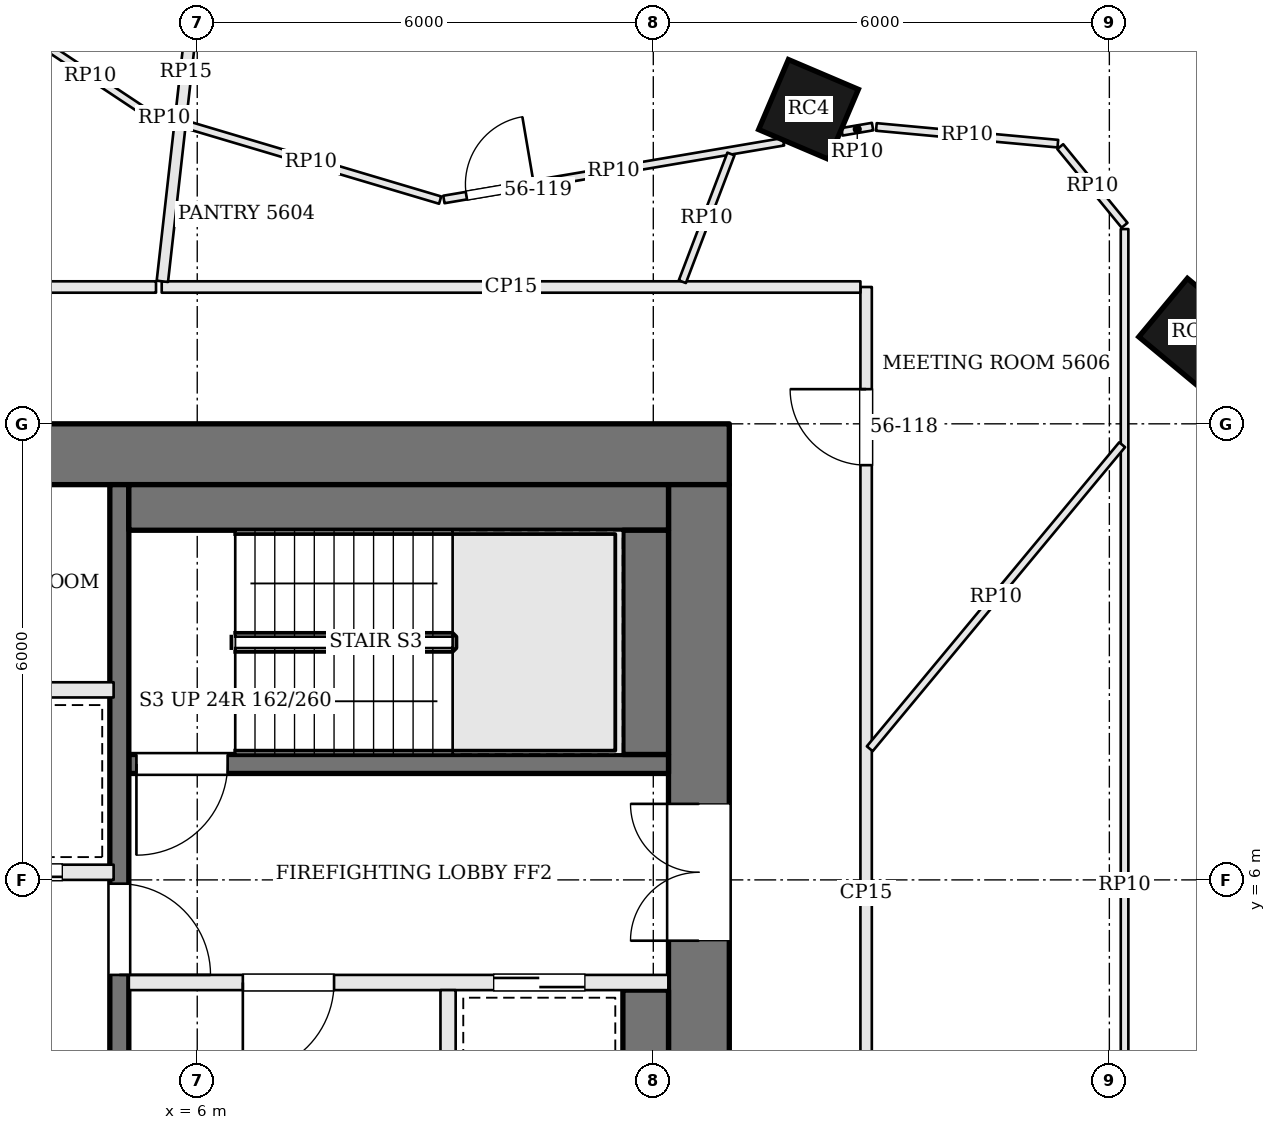
"""IFC4 building model, lengths in metres.
Left out: names, types, materials, properties, quantities, classifications, styles, units other than length and angle.
Written with IfcOpenShell. Run it as: python <this file> out.ifc"""

import sys

from ifc_helpers import new_model, si_unit, direction, frame, frame_2d, origin, origin_2d, place, context, subcontext, project, spatial, rectangle, extrude, element, fill, save


model = new_model("IFC4")
c1 = context("Model", 3, precision=1e-05, world=origin(), true_north=direction((0.0, 1.0)))
c2 = subcontext(c1, "Body", "Model", "MODEL_VIEW")
j1 = project(units=[si_unit("LENGTHUNIT", "METRE"), si_unit("PLANEANGLEUNIT", "RADIAN")], contexts=[c1])
p1 = place(None, origin())
s1 = spatial("IfcSite", under=j1, at=p1, CompositionType="ELEMENT")
p2 = place(p1, origin())
s2 = spatial("IfcBuilding", under=s1, at=p2, CompositionType="ELEMENT")
p3 = place(p2, frame((0.0, 0.0, 229.2)))
s3 = spatial("IfcBuildingStorey", under=s2, at=p3, CompositionType="ELEMENT", Elevation=229.2)
p4 = place(p3, frame((-13.0, 11.6, 0.0), z_axis=(0.0, 0.0, 1.0), x_axis=(1.0, 0.0, 0.0)))
e1 = element("IfcWall", 1, at=p4, inside=s3, PredefinedType="SHEAR", context=c2, shape_type="SweptSolid", body=[
    extrude(rectangle(XDim=26.0, YDim=0.8, at=frame_2d((13.0, 0.0))), origin(), (0.0, 0.0, 1.0), 3.9),
])
p5 = place(p4, frame((8.575, 0.0, 0.0)))
e2 = element("IfcOpeningElement", 2, at=p5, cuts=e1, PredefinedType="OPENING", context=c2, shape_type="SweptSolid", body=[
    extrude(rectangle(XDim=0.7, YDim=2.1, at=frame_2d((0.35, 1.05))), frame((0.0, 0.41, 0.0), z_axis=(0.0, -1.0, 0.0), x_axis=(1.0, 0.0, 0.0)), (0.0, 0.0, 1.0), 0.82),
])
p6 = place(p4, frame((10.625, 0.0, 0.0)))
e3 = element("IfcOpeningElement", 3, at=p6, cuts=e1, PredefinedType="OPENING", context=c2, shape_type="SweptSolid", body=[
    extrude(rectangle(XDim=0.7, YDim=2.1, at=frame_2d((0.35, 1.05))), frame((0.0, 0.41, 0.0), z_axis=(0.0, -1.0, 0.0), x_axis=(1.0, 0.0, 0.0)), (0.0, 0.0, 1.0), 0.82),
])
p7 = place(p4, frame((13.325, 0.0, 0.0)))
e4 = element("IfcOpeningElement", 4, at=p7, cuts=e1, PredefinedType="OPENING", context=c2, shape_type="SweptSolid", body=[
    extrude(rectangle(XDim=1.0, YDim=2.1, at=frame_2d((0.5, 1.05))), frame((0.0, 0.41, 0.0), z_axis=(0.0, -1.0, 0.0), x_axis=(1.0, 0.0, 0.0)), (0.0, 0.0, 1.0), 0.82),
])
p8 = place(p4, frame((15.65, 0.0, 0.0)))
e5 = element("IfcOpeningElement", 5, at=p8, cuts=e1, PredefinedType="OPENING", context=c2, shape_type="SweptSolid", body=[
    extrude(rectangle(XDim=1.0, YDim=2.1, at=frame_2d((0.5, 1.05))), frame((0.0, 0.41, 0.0), z_axis=(0.0, -1.0, 0.0), x_axis=(1.0, 0.0, 0.0)), (0.0, 0.0, 1.0), 0.82),
])
p9 = place(p3, frame((12.6, -2.2, 0.0), z_axis=(0.0, 0.0, 1.0), x_axis=(0.0, 1.0, 0.0)))
e6 = element("IfcWall", 6, at=p9, inside=s3, PredefinedType="SHEAR", context=c2, shape_type="SweptSolid", body=[
    extrude(rectangle(XDim=13.4, YDim=0.8, at=frame_2d((6.7, 0.0))), origin(), (0.0, 0.0, 1.0), 3.9),
])
p10 = place(p9, frame((7.4, 0.0, 0.0)))
e7 = element("IfcOpeningElement", 7, at=p10, cuts=e6, PredefinedType="OPENING", context=c2, shape_type="SweptSolid", body=[
    extrude(rectangle(XDim=1.8, YDim=2.1, at=frame_2d((0.9, 1.05))), frame((0.0, 0.41, 0.0), z_axis=(0.0, -1.0, 0.0), x_axis=(1.0, 0.0, 0.0)), (0.0, 0.0, 1.0), 0.82),
])
for number, where, z_axis, x_axis in (
    (8, (19.092, 13.209, 0.0), (0.0, 0.0, 1.0), (-0.769, 0.639, 0.0)),
    (9, (14.042, 16.136, 0.0), (0.0, 0.0, 1.0), (-0.92, 0.392, 0.0)),
):
    element("IfcColumn", number, at=place(p3, frame(where, z_axis=z_axis, x_axis=x_axis)), inside=s3, PredefinedType="COLUMN", context=c2, shape_type="SweptSolid", body=[
        extrude(rectangle(XDim=1.0, YDim=1.0, at=origin_2d()), origin(), (0.0, 0.0, 1.0), 3.9),
    ])
p11 = place(p3, frame((21.696, 15.748, 0.0), z_axis=(0.0, 0.0, 1.0), x_axis=(-0.632968710519, 0.774177377288, 0.0)))
e10 = element("IfcWall", 10, at=p11, inside=s3, PredefinedType="SOLIDWALL", context=c2, shape_type="SweptSolid", body=[
    extrude(rectangle(XDim=4.25, YDim=0.45, at=frame_2d((2.125, 0.0))), origin(), (0.0, 0.0, 1.0), 3.7),
])
p12 = place(p11, frame((1.075, 0.0, 0.9)))
e11 = element("IfcOpeningElement", 11, at=p12, cuts=e10, PredefinedType="OPENING", context=c2, shape_type="SweptSolid", body=[
    extrude(rectangle(XDim=2.1, YDim=2.3, at=frame_2d((1.05, 1.15))), frame((0.0, 0.235, 0.0), z_axis=(0.0, -1.0, 0.0), x_axis=(1.0, 0.0, 0.0)), (0.0, 0.0, 1.0), 0.47),
])
p13 = place(p3, frame((12.2, 7.525, 0.0), z_axis=(0.0, 0.0, 1.0), x_axis=(-1.0, 0.0, 0.0)))
e12 = element("IfcWall", 12, at=p13, inside=s3, PredefinedType="SOLIDWALL", context=c2, shape_type="SweptSolid", body=[
    extrude(rectangle(XDim=7.1, YDim=0.25, at=frame_2d((3.55, 0.0))), origin(), (0.0, 0.0, 1.0), 3.7),
])
p14 = place(p13, frame((5.8, 0.0, 0.0)))
e13 = element("IfcOpeningElement", 13, at=p14, cuts=e12, PredefinedType="OPENING", context=c2, shape_type="SweptSolid", body=[
    extrude(rectangle(XDim=1.2, YDim=2.1, at=frame_2d((0.6, 1.05))), frame((0.0, 0.135, 0.0), z_axis=(0.0, -1.0, 0.0), x_axis=(1.0, 0.0, 0.0)), (0.0, 0.0, 1.0), 0.27),
])
p15 = place(p3, frame((12.2, 4.65, 0.0), z_axis=(0.0, 0.0, 1.0), x_axis=(-1.0, 0.0, 0.0)))
e14 = element("IfcWall", 14, at=p15, inside=s3, PredefinedType="SOLIDWALL", context=c2, shape_type="SweptSolid", body=[
    extrude(rectangle(XDim=7.1, YDim=0.2, at=frame_2d((3.55, 0.0))), origin(), (0.0, 0.0, 1.0), 3.7),
])
p16 = place(p15, frame((4.4, 0.0, 0.0)))
e15 = element("IfcOpeningElement", 15, at=p16, cuts=e14, PredefinedType="OPENING", context=c2, shape_type="SweptSolid", body=[
    extrude(rectangle(XDim=1.2, YDim=2.1, at=frame_2d((0.6, 1.05))), frame((0.0, 0.11, 0.0), z_axis=(0.0, -1.0, 0.0), x_axis=(1.0, 0.0, 0.0)), (0.0, 0.0, 1.0), 0.22),
])
p17 = place(p15, frame((1.1, 0.0, 0.0)))
e16 = element("IfcOpeningElement", 16, at=p17, cuts=e14, PredefinedType="OPENING", context=c2, shape_type="SweptSolid", body=[
    extrude(rectangle(XDim=1.2, YDim=2.1, at=frame_2d((0.6, 1.05))), frame((0.0, 0.11, 0.0), z_axis=(0.0, -1.0, 0.0), x_axis=(1.0, 0.0, 0.0)), (0.0, 0.0, 1.0), 0.22),
])
p18 = place(p3, frame((9.3, 4.55, 0.0), z_axis=(0.0, 0.0, 1.0), x_axis=(0.0, -1.0, 0.0)))
e17 = element("IfcWall", 17, at=p18, inside=s3, PredefinedType="SOLIDWALL", context=c2, shape_type="SweptSolid", body=[
    extrude(rectangle(XDim=3.0, YDim=0.2, at=frame_2d((1.5, 0.0))), origin(), (0.0, 0.0, 1.0), 3.7),
])
p19 = place(p3, frame((4.975, 11.2, 0.0), z_axis=(0.0, 0.0, 1.0), x_axis=(0.0, -1.0, 0.0)))
e18 = element("IfcWall", 18, at=p19, inside=s3, PredefinedType="SOLIDWALL", context=c2, shape_type="SweptSolid", body=[
    extrude(rectangle(XDim=13.4, YDim=0.25, at=frame_2d((6.7, 0.0))), origin(), (0.0, 0.0, 1.0), 3.7),
])
p20 = place(p19, frame((5.25, 0.0, 0.0)))
e19 = element("IfcOpeningElement", 19, at=p20, cuts=e18, PredefinedType="OPENING", context=c2, shape_type="SweptSolid", body=[
    extrude(rectangle(XDim=1.2, YDim=2.1, at=frame_2d((0.6, 1.05))), frame((0.0, 0.135, 0.0), z_axis=(0.0, -1.0, 0.0), x_axis=(1.0, 0.0, 0.0)), (0.0, 0.0, 1.0), 0.27),
])
p21 = place(p3, frame((12.2, 10.9, 0.0), z_axis=(0.0, 0.0, 1.0), x_axis=(-1.0, 0.0, 0.0)))
e20 = element("IfcWall", 20, at=p21, inside=s3, PredefinedType="SOLIDWALL", context=c2, shape_type="SweptSolid", body=[
    extrude(rectangle(XDim=7.1, YDim=0.6, at=frame_2d((3.55, 0.0))), origin(), (0.0, 0.0, 1.0), 3.7),
])
p22 = place(p3, frame((11.9, 10.6, 0.0), z_axis=(0.0, 0.0, 1.0), x_axis=(0.0, -1.0, 0.0)))
e21 = element("IfcWall", 21, at=p22, inside=s3, PredefinedType="SOLIDWALL", context=c2, shape_type="SweptSolid", body=[
    extrude(rectangle(XDim=2.95, YDim=0.6, at=frame_2d((1.475, 0.0))), origin(), (0.0, 0.0, 1.0), 3.7),
])
p23 = place(p3, frame((11.9, 4.55, 0.0), z_axis=(0.0, 0.0, 1.0), x_axis=(0.0, -1.0, 0.0)))
e22 = element("IfcWall", 22, at=p23, inside=s3, PredefinedType="SOLIDWALL", context=c2, shape_type="SweptSolid", body=[
    extrude(rectangle(XDim=3.0, YDim=0.6, at=frame_2d((1.5, 0.0))), origin(), (0.0, 0.0, 1.0), 3.7),
])
p24 = place(p3, frame((-4.9, 6.1, 0.0), z_axis=(0.0, 0.0, 1.0), x_axis=(1.0, 0.0, 0.0)))
e23 = element("IfcWall", 23, at=p24, inside=s3, PredefinedType="SOLIDWALL", context=c2, shape_type="SweptSolid", body=[
    extrude(rectangle(XDim=9.8, YDim=0.2, at=frame_2d((4.9, 0.0))), origin(), (0.0, 0.0, 1.0), 3.7),
])
p25 = place(p24, frame((0.675, 0.0, 0.0)))
e24 = element("IfcOpeningElement", 24, at=p25, cuts=e23, PredefinedType="OPENING", context=c2, shape_type="SweptSolid", body=[
    extrude(rectangle(XDim=1.1, YDim=2.1, at=frame_2d((0.55, 1.05))), frame((0.0, 0.11, 0.0), z_axis=(0.0, -1.0, 0.0), x_axis=(1.0, 0.0, 0.0)), (0.0, 0.0, 1.0), 0.22),
])
p26 = place(p24, frame((3.125, 0.0, 0.0)))
e25 = element("IfcOpeningElement", 25, at=p26, cuts=e23, PredefinedType="OPENING", context=c2, shape_type="SweptSolid", body=[
    extrude(rectangle(XDim=1.1, YDim=2.1, at=frame_2d((0.55, 1.05))), frame((0.0, 0.11, 0.0), z_axis=(0.0, -1.0, 0.0), x_axis=(1.0, 0.0, 0.0)), (0.0, 0.0, 1.0), 0.22),
])
p27 = place(p24, frame((5.575, 0.0, 0.0)))
e26 = element("IfcOpeningElement", 26, at=p27, cuts=e23, PredefinedType="OPENING", context=c2, shape_type="SweptSolid", body=[
    extrude(rectangle(XDim=1.1, YDim=2.1, at=frame_2d((0.55, 1.05))), frame((0.0, 0.11, 0.0), z_axis=(0.0, -1.0, 0.0), x_axis=(1.0, 0.0, 0.0)), (0.0, 0.0, 1.0), 0.22),
])
p28 = place(p24, frame((8.025, 0.0, 0.0)))
e27 = element("IfcOpeningElement", 27, at=p28, cuts=e23, PredefinedType="OPENING", context=c2, shape_type="SweptSolid", body=[
    extrude(rectangle(XDim=1.1, YDim=2.1, at=frame_2d((0.55, 1.05))), frame((0.0, 0.11, 0.0), z_axis=(0.0, -1.0, 0.0), x_axis=(1.0, 0.0, 0.0)), (0.0, 0.0, 1.0), 0.22),
])
p29 = place(p3, frame((-4.9, 8.5, 0.0), z_axis=(0.0, 0.0, 1.0), x_axis=(1.0, 0.0, 0.0)))
e28 = element("IfcWall", 28, at=p29, inside=s3, PredefinedType="SOLIDWALL", context=c2, shape_type="SweptSolid", body=[
    extrude(rectangle(XDim=9.8, YDim=0.2, at=frame_2d((4.9, 0.0))), origin(), (0.0, 0.0, 1.0), 3.7),
])
p30 = place(p3, frame((14.8, -2.142, 0.0), z_axis=(0.0, 0.0, 1.0), x_axis=(0.0, 1.0, 0.0)))
e29 = element("IfcWall", 29, at=p30, inside=s3, PredefinedType="PARTITIONING", context=c2, shape_type="SweptSolid", body=[
    extrude(rectangle(XDim=15.942, YDim=0.15, at=frame_2d((7.971, 0.0))), origin(), (0.0, 0.0, 1.0), 3.084),
])
p31 = place(p30, frame((3.967, 0.0, 0.0)))
e30 = element("IfcOpeningElement", 30, at=p31, cuts=e29, PredefinedType="OPENING", context=c2, shape_type="SweptSolid", body=[
    extrude(rectangle(XDim=1.8, YDim=2.1, at=frame_2d((0.9, 1.05))), frame((0.0, 0.085, 0.0), z_axis=(0.0, -1.0, 0.0), x_axis=(1.0, 0.0, 0.0)), (0.0, 0.0, 1.0), 0.17),
])
p32 = place(p30, frame((13.598, 0.0, 0.0)))
e31 = element("IfcOpeningElement", 31, at=p32, cuts=e29, PredefinedType="OPENING", context=c2, shape_type="SweptSolid", body=[
    extrude(rectangle(XDim=1.0, YDim=2.4, at=frame_2d((0.5, 1.2))), frame((0.0, 0.085, 0.0), z_axis=(0.0, -1.0, 0.0), x_axis=(1.0, 0.0, 0.0)), (0.0, 0.0, 1.0), 0.17),
])
p33 = place(p3, frame((14.725, 13.8, 0.0), z_axis=(0.0, 0.0, 1.0), x_axis=(-1.0, 0.0, 0.0)))
e32 = element("IfcWall", 32, at=p33, inside=s3, PredefinedType="PARTITIONING", context=c2, shape_type="SweptSolid", body=[
    extrude(rectangle(XDim=9.192, YDim=0.15, at=frame_2d((4.596, 0.0))), origin(), (0.0, 0.0, 1.0), 3.084),
])
p34 = place(p3, frame((6.161, 19.377, 0.0), z_axis=(0.0, 0.0, 1.0), x_axis=(-0.11193626313, -0.993715388326, 0.0)))
e33 = element("IfcWall", 33, at=p34, inside=s3, PredefinedType="PARTITIONING", context=c2, shape_type="SweptSolid", body=[
    extrude(rectangle(XDim=5.538, YDim=0.15, at=frame_2d((2.769, 0.0))), origin(), (0.0, 0.0, 1.0), 3.234),
])
p35 = place(p3, frame((5.458, 13.8, 0.0), z_axis=(0.0, 0.0, 1.0), x_axis=(-1.0, 0.0, 0.0)))
e34 = element("IfcWall", 34, at=p35, inside=s3, PredefinedType="PARTITIONING", context=c2, shape_type="SweptSolid", body=[
    extrude(rectangle(XDim=11.056, YDim=0.15, at=frame_2d((5.528, 0.0))), origin(), (0.0, 0.0, 1.0), 3.084),
])
p36 = place(p35, frame((1.82, 0.0, 0.0)))
e35 = element("IfcOpeningElement", 35, at=p36, cuts=e34, PredefinedType="OPENING", context=c2, shape_type="SweptSolid", body=[
    extrude(rectangle(XDim=1.8, YDim=2.1, at=frame_2d((0.9, 1.05))), frame((0.0, 0.085, 0.0), z_axis=(0.0, -1.0, 0.0), x_axis=(1.0, 0.0, 0.0)), (0.0, 0.0, 1.0), 0.17),
])
p37 = place(p35, frame((6.488, 0.0, 0.0)))
e36 = element("IfcOpeningElement", 36, at=p37, cuts=e34, PredefinedType="OPENING", context=c2, shape_type="SweptSolid", body=[
    extrude(rectangle(XDim=1.0, YDim=2.4, at=frame_2d((0.5, 1.2))), frame((0.0, 0.085, 0.0), z_axis=(0.0, -1.0, 0.0), x_axis=(1.0, 0.0, 0.0)), (0.0, 0.0, 1.0), 0.17),
])
p38 = place(p35, frame((9.25, 0.0, 0.0)))
e37 = element("IfcOpeningElement", 37, at=p38, cuts=e34, PredefinedType="OPENING", context=c2, shape_type="SweptSolid", body=[
    extrude(rectangle(XDim=0.9, YDim=2.1, at=frame_2d((0.45, 1.05))), frame((0.0, 0.085, 0.0), z_axis=(0.0, -1.0, 0.0), x_axis=(1.0, 0.0, 0.0)), (0.0, 0.0, 1.0), 0.17),
])
p39 = place(p3, frame((5.795, 15.954, 0.0), z_axis=(0.0, 0.0, 1.0), x_axis=(0.95851298226, -0.285048877981, 0.0)))
e38 = element("IfcWall", 38, at=p39, inside=s3, PredefinedType="PARTITIONING", context=c2, shape_type="SweptSolid", body=[
    extrude(rectangle(XDim=3.548, YDim=0.1, at=frame_2d((1.774, 0.0))), origin(), (0.0, 0.0, 1.0), 3.084),
])
p40 = place(p3, frame((9.245, 14.952, 0.0), z_axis=(0.0, 0.0, 1.0), x_axis=(0.985863233989, 0.167552033319, 0.0)))
e39 = element("IfcWall", 39, at=p40, inside=s3, PredefinedType="PARTITIONING", context=c2, shape_type="SweptSolid", body=[
    extrude(rectangle(XDim=4.531, YDim=0.1, at=frame_2d((2.266, 0.0))), origin(), (0.0, 0.0, 1.0), 3.084),
])
p41 = place(p40, frame((0.3, 0.0, 0.0)))
e40 = element("IfcOpeningElement", 40, at=p41, cuts=e39, PredefinedType="OPENING", context=c2, shape_type="SweptSolid", body=[
    extrude(rectangle(XDim=0.9, YDim=2.1, at=frame_2d((0.45, 1.05))), frame((0.0, 0.06, 0.0), z_axis=(0.0, -1.0, 0.0), x_axis=(1.0, 0.0, 0.0)), (0.0, 0.0, 1.0), 0.12),
])
p42 = place(p3, frame((14.482, 15.842, 0.0), z_axis=(0.0, 0.0, 1.0), x_axis=(0.985806446381, 0.167885825111, 0.0)))
e41 = element("IfcWall", 41, at=p42, inside=s3, PredefinedType="PARTITIONING", context=c2, shape_type="SweptSolid", body=[
    extrude(rectangle(XDim=0.409, YDim=0.1, at=frame_2d((0.204, 0.0))), origin(), (0.0, 0.0, 1.0), 3.084),
])
p43 = place(p3, frame((14.935, 15.906, 0.0), z_axis=(0.0, 0.0, 1.0), x_axis=(0.995783150827, -0.09173830459, 0.0)))
e42 = element("IfcWall", 42, at=p43, inside=s3, PredefinedType="PARTITIONING", context=c2, shape_type="SweptSolid", body=[
    extrude(rectangle(XDim=2.398, YDim=0.1, at=frame_2d((1.199, 0.0))), origin(), (0.0, 0.0, 1.0), 3.084),
])
p44 = place(p3, frame((17.354, 15.647, 0.0), z_axis=(0.0, 0.0, 1.0), x_axis=(0.632969165494, -0.774177005299, 0.0)))
e43 = element("IfcWall", 43, at=p44, inside=s3, PredefinedType="PARTITIONING", context=c2, shape_type="SweptSolid", body=[
    extrude(rectangle(XDim=1.336, YDim=0.1, at=frame_2d((0.668, 0.0))), origin(), (0.0, 0.0, 1.0), 3.084),
])
p45 = place(p3, frame((18.2, 14.562, 0.0), z_axis=(0.0, 0.0, 1.0), x_axis=(0.0, -1.0, 0.0)))
e44 = element("IfcWall", 44, at=p45, inside=s3, PredefinedType="PARTITIONING", context=c2, shape_type="SweptSolid", body=[
    extrude(rectangle(XDim=17.267, YDim=0.1, at=frame_2d((8.634, 0.0))), origin(), (0.0, 0.0, 1.0), 3.084),
])
p46 = place(p45, frame((11.024, 0.0, 0.0)))
e45 = element("IfcOpeningElement", 45, at=p46, cuts=e44, PredefinedType="OPENING", context=c2, shape_type="SweptSolid", body=[
    extrude(rectangle(XDim=1.0, YDim=2.1, at=frame_2d((0.5, 1.05))), frame((0.0, 0.06, 0.0), z_axis=(0.0, -1.0, 0.0), x_axis=(1.0, 0.0, 0.0)), (0.0, 0.0, 1.0), 0.12),
])
p47 = place(p3, frame((14.848, 7.725, 0.0), z_axis=(0.0, 0.0, 1.0), x_axis=(0.638751178804, 0.769413368468, 0.0)))
e46 = element("IfcWall", 46, at=p47, inside=s3, PredefinedType="PARTITIONING", context=c2, shape_type="SweptSolid", body=[
    extrude(rectangle(XDim=5.198, YDim=0.1, at=frame_2d((2.599, 0.0))), origin(), (0.0, 0.0, 1.0), 3.084),
])
p48 = place(p3, frame((12.382, 13.87, 0.0), z_axis=(0.0, 0.0, 1.0), x_axis=(0.355763716993, 0.934575934674, 0.0)))
e47 = element("IfcWall", 47, at=p48, inside=s3, PredefinedType="PARTITIONING", context=c2, shape_type="SweptSolid", body=[
    extrude(rectangle(XDim=1.797, YDim=0.1, at=frame_2d((0.899, 0.0))), origin(), (0.0, 0.0, 1.0), 3.084),
])
p49 = place(p3, frame((3.855, 17.072, 0.0), z_axis=(0.0, 0.0, 1.0), x_axis=(0.832961782109, -0.553330524683, 0.0)))
e48 = element("IfcWall", 48, at=p49, inside=s3, PredefinedType="PARTITIONING", context=c2, shape_type="SweptSolid", body=[
    extrude(rectangle(XDim=1.77, YDim=0.1, at=frame_2d((0.885, 0.0))), origin(), (0.0, 0.0, 1.0), 3.084),
])
p50 = place(p3, frame((5.377, 16.079, 0.0), z_axis=(0.0, 0.0, 1.0), x_axis=(0.958536356279, -0.284970268083, 0.0)))
e49 = element("IfcWall", 49, at=p50, inside=s3, PredefinedType="PARTITIONING", context=c2, shape_type="SweptSolid", body=[
    extrude(rectangle(XDim=0.396, YDim=0.1, at=frame_2d((0.198, 0.0))), origin(), (0.0, 0.0, 1.0), 3.084),
])
p51 = place(p10, origin())
e50 = element("IfcDoor", 50, at=p51, inside=s3, OperationType="DOUBLE_DOOR_SINGLE_SWING", PredefinedType="DOOR", context=c2, shape_type="SweptSolid", body=[
    extrude(rectangle(XDim=1.8, YDim=2.1, at=frame_2d((0.9, 1.05))), frame((0.0, 0.025, 0.0), z_axis=(0.0, -1.0, 0.0), x_axis=(1.0, 0.0, 0.0)), (0.0, 0.0, 1.0), 0.05),
])
fill(e7, e50)
p52 = place(p20, origin())
e51 = element("IfcDoor", 51, at=p52, inside=s3, OperationType="SINGLE_SWING_RIGHT", PredefinedType="DOOR", context=c2, shape_type="SweptSolid", body=[
    extrude(rectangle(XDim=1.2, YDim=2.1, at=frame_2d((0.6, 1.05))), frame((0.0, 0.025, 0.0), z_axis=(0.0, -1.0, 0.0), x_axis=(1.0, 0.0, 0.0)), (0.0, 0.0, 1.0), 0.05),
])
fill(e19, e51)
p53 = place(p16, origin())
e52 = element("IfcDoor", 52, at=p53, inside=s3, OperationType="SINGLE_SWING_RIGHT", PredefinedType="DOOR", context=c2, shape_type="SweptSolid", body=[
    extrude(rectangle(XDim=1.2, YDim=2.1, at=frame_2d((0.6, 1.05))), frame((0.0, 0.025, 0.0), z_axis=(0.0, -1.0, 0.0), x_axis=(1.0, 0.0, 0.0)), (0.0, 0.0, 1.0), 0.05),
])
fill(e15, e52)
p54 = place(p14, origin())
e53 = element("IfcDoor", 53, at=p54, inside=s3, OperationType="SINGLE_SWING_RIGHT", PredefinedType="DOOR", context=c2, shape_type="SweptSolid", body=[
    extrude(rectangle(XDim=1.2, YDim=2.1, at=frame_2d((0.6, 1.05))), frame((0.0, 0.025, 0.0), z_axis=(0.0, -1.0, 0.0), x_axis=(1.0, 0.0, 0.0)), (0.0, 0.0, 1.0), 0.05),
])
fill(e13, e53)
p55 = place(p17, origin())
e54 = element("IfcDoor", 54, at=p55, inside=s3, OperationType="SLIDING_TO_RIGHT", PredefinedType="DOOR", context=c2, shape_type="SweptSolid", body=[
    extrude(rectangle(XDim=1.2, YDim=2.1, at=frame_2d((0.6, 1.05))), frame((0.0, 0.025, 0.0), z_axis=(0.0, -1.0, 0.0), x_axis=(1.0, 0.0, 0.0)), (0.0, 0.0, 1.0), 0.05),
])
fill(e16, e54)
p56 = place(p28, origin())
e55 = element("IfcDoor", 55, at=p56, inside=s3, OperationType="SLIDING_TO_LEFT", PredefinedType="DOOR", context=c2, shape_type="SweptSolid", body=[
    extrude(rectangle(XDim=1.1, YDim=2.1, at=frame_2d((0.55, 1.05))), frame((0.0, 0.025, 0.0), z_axis=(0.0, -1.0, 0.0), x_axis=(1.0, 0.0, 0.0)), (0.0, 0.0, 1.0), 0.05),
])
fill(e27, e55)
p57 = place(p32, origin())
e56 = element("IfcDoor", 56, at=p57, inside=s3, OperationType="SINGLE_SWING_RIGHT", PredefinedType="DOOR", context=c2, shape_type="SweptSolid", body=[
    extrude(rectangle(XDim=1.0, YDim=2.4, at=frame_2d((0.5, 1.2))), frame((0.0, 0.025, 0.0), z_axis=(0.0, -1.0, 0.0), x_axis=(1.0, 0.0, 0.0)), (0.0, 0.0, 1.0), 0.05),
])
fill(e31, e56)
p58 = place(p41, origin())
e57 = element("IfcDoor", 57, at=p58, inside=s3, OperationType="SINGLE_SWING_RIGHT", PredefinedType="DOOR", context=c2, shape_type="SweptSolid", body=[
    extrude(rectangle(XDim=0.9, YDim=2.1, at=frame_2d((0.45, 1.05))), frame((0.0, 0.025, 0.0), z_axis=(0.0, -1.0, 0.0), x_axis=(1.0, 0.0, 0.0)), (0.0, 0.0, 1.0), 0.05),
])
fill(e40, e57)
save(model, sys.argv[1])
